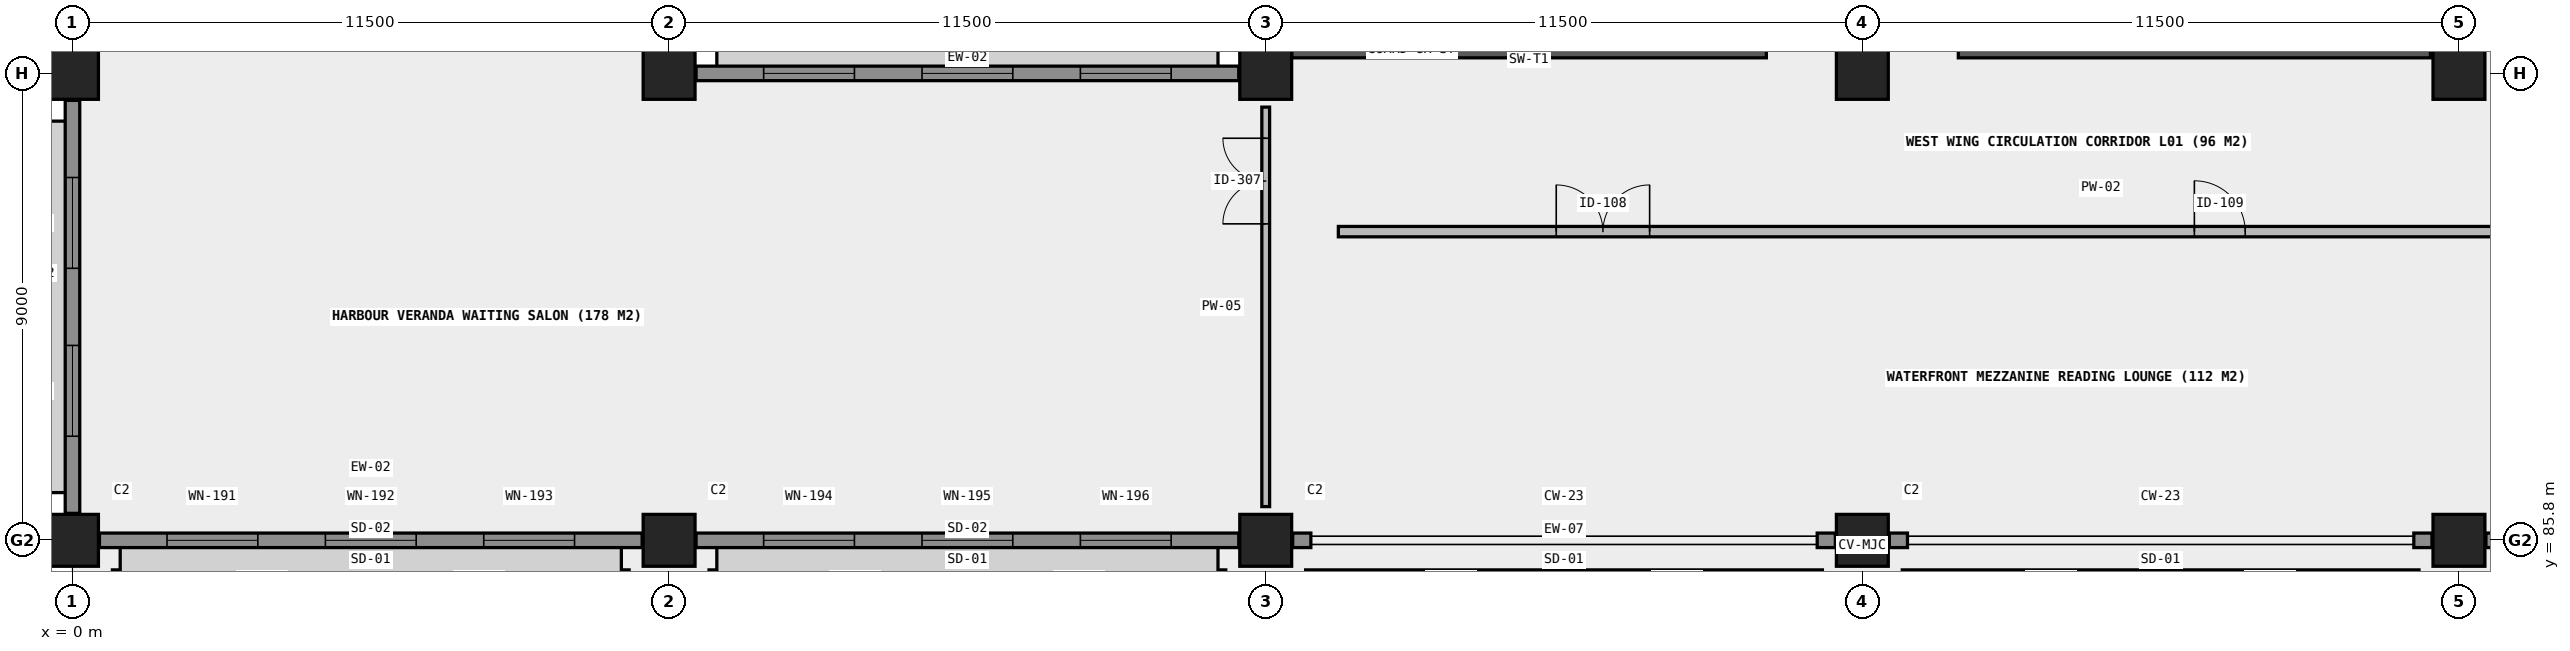
"""IFC4 building model, lengths in metres.
Left out: names, types, materials, properties, quantities, classifications, styles, units other than length and angle.
Written with IfcOpenShell. Run it as: python <this file> out.ifc"""

import sys

from ifc_helpers import new_model, si_unit, direction, frame, frame_2d, origin, origin_2d, place, context, subcontext, project, spatial, rectangle, extrude, element, fill, save


model = new_model("IFC4")
c1 = context("Model", 3, precision=1e-05, world=origin(), true_north=direction((0.0, 1.0)))
c2 = subcontext(c1, "Body", "Model", "MODEL_VIEW")
j1 = project(units=[si_unit("LENGTHUNIT", "METRE"), si_unit("PLANEANGLEUNIT", "RADIAN")], contexts=[c1])
p1 = place(None, origin())
s1 = spatial("IfcSite", under=j1, at=p1, CompositionType="ELEMENT")
p2 = place(p1, origin())
s2 = spatial("IfcBuilding", under=s1, at=p2, CompositionType="ELEMENT")
p3 = place(p2, frame((0.0, 0.0, 4.2)))
s3 = spatial("IfcBuildingStorey", under=s2, at=p3, CompositionType="ELEMENT", Elevation=4.2)
for number, where, z_axis, x_axis in (
    (1, (0.0, 85.8, 0.0), (0.0, 0.0, 1.0), (1.0, 0.0, 0.0)),
    (2, (0.0, 94.8, 0.0), (0.0, 0.0, 1.0), (1.0, 0.0, 0.0)),
    (3, (11.5, 85.8, 0.0), (0.0, 0.0, 1.0), (1.0, 0.0, 0.0)),
    (4, (11.5, 94.8, 0.0), (0.0, 0.0, 1.0), (1.0, 0.0, 0.0)),
    (5, (23.0, 85.8, 0.0), (0.0, 0.0, 1.0), (1.0, 0.0, 0.0)),
    (6, (23.0, 94.8, 0.0), (0.0, 0.0, 1.0), (1.0, 0.0, 0.0)),
    (7, (34.5, 85.8, 0.0), (0.0, 0.0, 1.0), (1.0, 0.0, 0.0)),
    (8, (34.5, 94.8, 0.0), (0.0, 0.0, 1.0), (1.0, 0.0, 0.0)),
    (9, (46.0, 85.8, 0.0), (0.0, 0.0, 1.0), (1.0, 0.0, 0.0)),
    (10, (46.0, 94.8, 0.0), (0.0, 0.0, 1.0), (1.0, 0.0, 0.0)),
):
    element("IfcColumn", number, at=place(p3, frame(where, z_axis=z_axis, x_axis=x_axis)), inside=s3, PredefinedType="COLUMN", context=c2, shape_type="SweptSolid", body=[
        extrude(rectangle(XDim=1.0, YDim=1.0, at=origin_2d()), origin(), (0.0, 0.0, 1.0), 4.2),
    ])
p4 = place(p3, frame((23.5, 95.325, 0.0), z_axis=(0.0, 0.0, 1.0), x_axis=(1.0, 0.0, 0.0)))
e11 = element("IfcWall", 11, at=p4, inside=s3, PredefinedType="SHEAR", context=c2, shape_type="SweptSolid", body=[
    extrude(rectangle(XDim=9.15, YDim=0.45, at=frame_2d((4.575, 0.0))), origin(), (0.0, 0.0, 1.0), 4.2),
])
p5 = place(p3, frame((36.35, 95.325, 0.0), z_axis=(0.0, 0.0, 1.0), x_axis=(1.0, 0.0, 0.0)))
e12 = element("IfcWall", 12, at=p5, inside=s3, PredefinedType="SHEAR", context=c2, shape_type="SweptSolid", body=[
    extrude(rectangle(XDim=9.1, YDim=0.45, at=frame_2d((4.55, 0.0))), origin(), (0.0, 0.0, 1.0), 4.2),
])
p6 = place(p3, frame((0.52, 85.8, 0.0), z_axis=(0.0, 0.0, 1.0), x_axis=(1.0, 0.0, 0.0)))
e13 = element("IfcWall", 13, at=p6, inside=s3, PredefinedType="SOLIDWALL", context=c2, shape_type="SweptSolid", body=[
    extrude(rectangle(XDim=10.46, YDim=0.28, at=frame_2d((5.23, 0.0))), origin(), (0.0, 0.0, 1.0), 3.15),
])
p7 = place(p6, frame((1.302, 0.0, 0.85)))
e14 = element("IfcOpeningElement", 14, at=p7, cuts=e13, PredefinedType="OPENING", context=c2, shape_type="SweptSolid", body=[
    extrude(rectangle(XDim=1.75, YDim=1.95, at=frame_2d((0.875, 0.975))), frame((0.0, 0.15, 0.0), z_axis=(0.0, -1.0, 0.0), x_axis=(1.0, 0.0, 0.0)), (0.0, 0.0, 1.0), 0.3),
])
p8 = place(p6, frame((4.355, 0.0, 0.85)))
e15 = element("IfcOpeningElement", 15, at=p8, cuts=e13, PredefinedType="OPENING", context=c2, shape_type="SweptSolid", body=[
    extrude(rectangle(XDim=1.75, YDim=1.95, at=frame_2d((0.875, 0.975))), frame((0.0, 0.15, 0.0), z_axis=(0.0, -1.0, 0.0), x_axis=(1.0, 0.0, 0.0)), (0.0, 0.0, 1.0), 0.3),
])
p9 = place(p6, frame((7.407, 0.0, 0.85)))
e16 = element("IfcOpeningElement", 16, at=p9, cuts=e13, PredefinedType="OPENING", context=c2, shape_type="SweptSolid", body=[
    extrude(rectangle(XDim=1.75, YDim=1.95, at=frame_2d((0.875, 0.975))), frame((0.0, 0.15, 0.0), z_axis=(0.0, -1.0, 0.0), x_axis=(1.0, 0.0, 0.0)), (0.0, 0.0, 1.0), 0.3),
])
p10 = place(p3, frame((12.02, 85.8, 0.0), z_axis=(0.0, 0.0, 1.0), x_axis=(1.0, 0.0, 0.0)))
e17 = element("IfcWall", 17, at=p10, inside=s3, PredefinedType="SOLIDWALL", context=c2, shape_type="SweptSolid", body=[
    extrude(rectangle(XDim=10.46, YDim=0.28, at=frame_2d((5.23, 0.0))), origin(), (0.0, 0.0, 1.0), 3.15),
])
p11 = place(p10, frame((1.302, 0.0, 0.85)))
e18 = element("IfcOpeningElement", 18, at=p11, cuts=e17, PredefinedType="OPENING", context=c2, shape_type="SweptSolid", body=[
    extrude(rectangle(XDim=1.75, YDim=1.95, at=frame_2d((0.875, 0.975))), frame((0.0, 0.15, 0.0), z_axis=(0.0, -1.0, 0.0), x_axis=(1.0, 0.0, 0.0)), (0.0, 0.0, 1.0), 0.3),
])
p12 = place(p10, frame((4.355, 0.0, 0.85)))
e19 = element("IfcOpeningElement", 19, at=p12, cuts=e17, PredefinedType="OPENING", context=c2, shape_type="SweptSolid", body=[
    extrude(rectangle(XDim=1.75, YDim=1.95, at=frame_2d((0.875, 0.975))), frame((0.0, 0.15, 0.0), z_axis=(0.0, -1.0, 0.0), x_axis=(1.0, 0.0, 0.0)), (0.0, 0.0, 1.0), 0.3),
])
p13 = place(p10, frame((7.407, 0.0, 0.85)))
e20 = element("IfcOpeningElement", 20, at=p13, cuts=e17, PredefinedType="OPENING", context=c2, shape_type="SweptSolid", body=[
    extrude(rectangle(XDim=1.75, YDim=1.95, at=frame_2d((0.875, 0.975))), frame((0.0, 0.15, 0.0), z_axis=(0.0, -1.0, 0.0), x_axis=(1.0, 0.0, 0.0)), (0.0, 0.0, 1.0), 0.3),
])
for number, where, z_axis, x_axis in (
    (21, (23.52, 85.8, 0.0), (0.0, 0.0, 1.0), (1.0, 0.0, 0.0)),
    (22, (33.63, 85.8, 0.0), (0.0, 0.0, 1.0), (1.0, 0.0, 0.0)),
    (23, (35.02, 85.8, 0.0), (0.0, 0.0, 1.0), (1.0, 0.0, 0.0)),
    (24, (45.13, 85.8, 0.0), (0.0, 0.0, 1.0), (1.0, 0.0, 0.0)),
):
    element("IfcWall", number, at=place(p3, frame(where, z_axis=z_axis, x_axis=x_axis)), inside=s3, PredefinedType="SOLIDWALL", context=c2, shape_type="SweptSolid", body=[
        extrude(rectangle(XDim=0.35, YDim=0.28, at=frame_2d((0.175, 0.0))), origin(), (0.0, 0.0, 1.0), 3.93),
    ])
p14 = place(p3, frame((46.52, 85.8, 0.0), z_axis=(0.0, 0.0, 1.0), x_axis=(1.0, 0.0, 0.0)))
e25 = element("IfcWall", 25, at=p14, inside=s3, PredefinedType="SOLIDWALL", context=c2, shape_type="SweptSolid", body=[
    extrude(rectangle(XDim=10.46, YDim=0.28, at=frame_2d((5.23, 0.0))), origin(), (0.0, 0.0, 1.0), 3.15),
])
p15 = place(p14, frame((1.302, 0.0, 0.85)))
e26 = element("IfcOpeningElement", 26, at=p15, cuts=e25, PredefinedType="OPENING", context=c2, shape_type="SweptSolid", body=[
    extrude(rectangle(XDim=1.75, YDim=1.95, at=frame_2d((0.875, 0.975))), frame((0.0, 0.15, 0.0), z_axis=(0.0, -1.0, 0.0), x_axis=(1.0, 0.0, 0.0)), (0.0, 0.0, 1.0), 0.3),
])
p16 = place(p14, frame((4.355, 0.0, 0.85)))
e27 = element("IfcOpeningElement", 27, at=p16, cuts=e25, PredefinedType="OPENING", context=c2, shape_type="SweptSolid", body=[
    extrude(rectangle(XDim=1.75, YDim=1.95, at=frame_2d((0.875, 0.975))), frame((0.0, 0.15, 0.0), z_axis=(0.0, -1.0, 0.0), x_axis=(1.0, 0.0, 0.0)), (0.0, 0.0, 1.0), 0.3),
])
p17 = place(p14, frame((7.407, 0.0, 0.85)))
e28 = element("IfcOpeningElement", 28, at=p17, cuts=e25, PredefinedType="OPENING", context=c2, shape_type="SweptSolid", body=[
    extrude(rectangle(XDim=1.75, YDim=1.95, at=frame_2d((0.875, 0.975))), frame((0.0, 0.15, 0.0), z_axis=(0.0, -1.0, 0.0), x_axis=(1.0, 0.0, 0.0)), (0.0, 0.0, 1.0), 0.3),
])
p18 = place(p3, frame((12.02, 94.8, 0.0), z_axis=(0.0, 0.0, 1.0), x_axis=(1.0, 0.0, 0.0)))
e29 = element("IfcWall", 29, at=p18, inside=s3, PredefinedType="SOLIDWALL", context=c2, shape_type="SweptSolid", body=[
    extrude(rectangle(XDim=10.46, YDim=0.28, at=frame_2d((5.23, 0.0))), origin(), (0.0, 0.0, 1.0), 3.15),
])
p19 = place(p18, frame((1.302, 0.0, 0.85)))
e30 = element("IfcOpeningElement", 30, at=p19, cuts=e29, PredefinedType="OPENING", context=c2, shape_type="SweptSolid", body=[
    extrude(rectangle(XDim=1.75, YDim=1.95, at=frame_2d((0.875, 0.975))), frame((0.0, 0.15, 0.0), z_axis=(0.0, -1.0, 0.0), x_axis=(1.0, 0.0, 0.0)), (0.0, 0.0, 1.0), 0.3),
])
p20 = place(p18, frame((4.355, 0.0, 0.85)))
e31 = element("IfcOpeningElement", 31, at=p20, cuts=e29, PredefinedType="OPENING", context=c2, shape_type="SweptSolid", body=[
    extrude(rectangle(XDim=1.75, YDim=1.95, at=frame_2d((0.875, 0.975))), frame((0.0, 0.15, 0.0), z_axis=(0.0, -1.0, 0.0), x_axis=(1.0, 0.0, 0.0)), (0.0, 0.0, 1.0), 0.3),
])
p21 = place(p18, frame((7.407, 0.0, 0.85)))
e32 = element("IfcOpeningElement", 32, at=p21, cuts=e29, PredefinedType="OPENING", context=c2, shape_type="SweptSolid", body=[
    extrude(rectangle(XDim=1.75, YDim=1.95, at=frame_2d((0.875, 0.975))), frame((0.0, 0.15, 0.0), z_axis=(0.0, -1.0, 0.0), x_axis=(1.0, 0.0, 0.0)), (0.0, 0.0, 1.0), 0.3),
])
p22 = place(p3, frame((0.0, 86.32, 0.0), z_axis=(0.0, 0.0, 1.0), x_axis=(0.0, 1.0, 0.0)))
e33 = element("IfcWall", 33, at=p22, inside=s3, PredefinedType="SOLIDWALL", context=c2, shape_type="SweptSolid", body=[
    extrude(rectangle(XDim=7.96, YDim=0.28, at=frame_2d((3.98, 0.0))), origin(), (0.0, 0.0, 1.0), 3.25),
])
p23 = place(p22, frame((1.487, 0.0, 0.85)))
e34 = element("IfcOpeningElement", 34, at=p23, cuts=e33, PredefinedType="OPENING", context=c2, shape_type="SweptSolid", body=[
    extrude(rectangle(XDim=1.75, YDim=1.95, at=frame_2d((0.875, 0.975))), frame((0.0, 0.15, 0.0), z_axis=(0.0, -1.0, 0.0), x_axis=(1.0, 0.0, 0.0)), (0.0, 0.0, 1.0), 0.3),
])
p24 = place(p22, frame((4.723, 0.0, 0.85)))
e35 = element("IfcOpeningElement", 35, at=p24, cuts=e33, PredefinedType="OPENING", context=c2, shape_type="SweptSolid", body=[
    extrude(rectangle(XDim=1.75, YDim=1.95, at=frame_2d((0.875, 0.975))), frame((0.0, 0.15, 0.0), z_axis=(0.0, -1.0, 0.0), x_axis=(1.0, 0.0, 0.0)), (0.0, 0.0, 1.0), 0.3),
])
p25 = place(p3, frame((24.4, 91.75, 0.0), z_axis=(0.0, 0.0, 1.0), x_axis=(1.0, 0.0, 0.0)))
e36 = element("IfcWall", 36, at=p25, inside=s3, PredefinedType="PARTITIONING", context=c2, shape_type="SweptSolid", body=[
    extrude(rectangle(XDim=29.4, YDim=0.2, at=frame_2d((14.7, 0.0))), origin(), (0.0, 0.0, 1.0), 3.84),
])
p26 = place(p25, frame((4.2, 0.0, 0.0)))
e37 = element("IfcOpeningElement", 37, at=p26, cuts=e36, PredefinedType="OPENING", context=c2, shape_type="SweptSolid", body=[
    extrude(rectangle(XDim=1.8, YDim=2.2, at=frame_2d((0.9, 1.1))), frame((0.0, 0.11, 0.0), z_axis=(0.0, -1.0, 0.0), x_axis=(1.0, 0.0, 0.0)), (0.0, 0.0, 1.0), 0.22),
])
p27 = place(p25, frame((16.5, 0.0, 0.0)))
e38 = element("IfcOpeningElement", 38, at=p27, cuts=e36, PredefinedType="OPENING", context=c2, shape_type="SweptSolid", body=[
    extrude(rectangle(XDim=0.98, YDim=2.15, at=frame_2d((0.49, 1.075))), frame((0.0, 0.11, 0.0), z_axis=(0.0, -1.0, 0.0), x_axis=(1.0, 0.0, 0.0)), (0.0, 0.0, 1.0), 0.22),
])
p28 = place(p3, frame((23.0, 86.45, 0.0), z_axis=(0.0, 0.0, 1.0), x_axis=(0.0, 1.0, 0.0)))
e39 = element("IfcWall", 39, at=p28, inside=s3, PredefinedType="PARTITIONING", context=c2, shape_type="SweptSolid", body=[
    extrude(rectangle(XDim=7.7, YDim=0.15, at=frame_2d((3.85, 0.0))), origin(), (0.0, 0.0, 1.0), 3.15),
])
p29 = place(p28, frame((5.45, 0.0, 0.0)))
e40 = element("IfcOpeningElement", 40, at=p29, cuts=e39, PredefinedType="OPENING", context=c2, shape_type="SweptSolid", body=[
    extrude(rectangle(XDim=1.65, YDim=2.2, at=frame_2d((0.825, 1.1))), frame((0.0, 0.085, 0.0), z_axis=(0.0, -1.0, 0.0), x_axis=(1.0, 0.0, 0.0)), (0.0, 0.0, 1.0), 0.17),
])
p30 = place(p7, origin())
e41 = element("IfcWindow", 41, at=p30, inside=s3, PartitioningType="SINGLE_PANEL", PredefinedType="WINDOW", context=c2, shape_type="SweptSolid", body=[
    extrude(rectangle(XDim=1.75, YDim=1.95, at=frame_2d((0.875, 0.975))), frame((0.0, 0.03, 0.0), z_axis=(0.0, -1.0, 0.0), x_axis=(1.0, 0.0, 0.0)), (0.0, 0.0, 1.0), 0.06),
])
fill(e14, e41)
p31 = place(p8, origin())
e42 = element("IfcWindow", 42, at=p31, inside=s3, PartitioningType="SINGLE_PANEL", PredefinedType="WINDOW", context=c2, shape_type="SweptSolid", body=[
    extrude(rectangle(XDim=1.75, YDim=1.95, at=frame_2d((0.875, 0.975))), frame((0.0, 0.03, 0.0), z_axis=(0.0, -1.0, 0.0), x_axis=(1.0, 0.0, 0.0)), (0.0, 0.0, 1.0), 0.06),
])
fill(e15, e42)
p32 = place(p9, origin())
e43 = element("IfcWindow", 43, at=p32, inside=s3, PartitioningType="SINGLE_PANEL", PredefinedType="WINDOW", context=c2, shape_type="SweptSolid", body=[
    extrude(rectangle(XDim=1.75, YDim=1.95, at=frame_2d((0.875, 0.975))), frame((0.0, 0.03, 0.0), z_axis=(0.0, -1.0, 0.0), x_axis=(1.0, 0.0, 0.0)), (0.0, 0.0, 1.0), 0.06),
])
fill(e16, e43)
p33 = place(p11, origin())
e44 = element("IfcWindow", 44, at=p33, inside=s3, PartitioningType="SINGLE_PANEL", PredefinedType="WINDOW", context=c2, shape_type="SweptSolid", body=[
    extrude(rectangle(XDim=1.75, YDim=1.95, at=frame_2d((0.875, 0.975))), frame((0.0, 0.03, 0.0), z_axis=(0.0, -1.0, 0.0), x_axis=(1.0, 0.0, 0.0)), (0.0, 0.0, 1.0), 0.06),
])
fill(e18, e44)
p34 = place(p12, origin())
e45 = element("IfcWindow", 45, at=p34, inside=s3, PartitioningType="SINGLE_PANEL", PredefinedType="WINDOW", context=c2, shape_type="SweptSolid", body=[
    extrude(rectangle(XDim=1.75, YDim=1.95, at=frame_2d((0.875, 0.975))), frame((0.0, 0.03, 0.0), z_axis=(0.0, -1.0, 0.0), x_axis=(1.0, 0.0, 0.0)), (0.0, 0.0, 1.0), 0.06),
])
fill(e19, e45)
p35 = place(p13, origin())
e46 = element("IfcWindow", 46, at=p35, inside=s3, PartitioningType="SINGLE_PANEL", PredefinedType="WINDOW", context=c2, shape_type="SweptSolid", body=[
    extrude(rectangle(XDim=1.75, YDim=1.95, at=frame_2d((0.875, 0.975))), frame((0.0, 0.03, 0.0), z_axis=(0.0, -1.0, 0.0), x_axis=(1.0, 0.0, 0.0)), (0.0, 0.0, 1.0), 0.06),
])
fill(e20, e46)
p36 = place(p19, origin())
e47 = element("IfcWindow", 47, at=p36, inside=s3, PartitioningType="SINGLE_PANEL", PredefinedType="WINDOW", context=c2, shape_type="SweptSolid", body=[
    extrude(rectangle(XDim=1.75, YDim=1.95, at=frame_2d((0.875, 0.975))), frame((0.0, 0.03, 0.0), z_axis=(0.0, -1.0, 0.0), x_axis=(1.0, 0.0, 0.0)), (0.0, 0.0, 1.0), 0.06),
])
fill(e30, e47)
p37 = place(p20, origin())
e48 = element("IfcWindow", 48, at=p37, inside=s3, PartitioningType="SINGLE_PANEL", PredefinedType="WINDOW", context=c2, shape_type="SweptSolid", body=[
    extrude(rectangle(XDim=1.75, YDim=1.95, at=frame_2d((0.875, 0.975))), frame((0.0, 0.03, 0.0), z_axis=(0.0, -1.0, 0.0), x_axis=(1.0, 0.0, 0.0)), (0.0, 0.0, 1.0), 0.06),
])
fill(e31, e48)
p38 = place(p21, origin())
e49 = element("IfcWindow", 49, at=p38, inside=s3, PartitioningType="SINGLE_PANEL", PredefinedType="WINDOW", context=c2, shape_type="SweptSolid", body=[
    extrude(rectangle(XDim=1.75, YDim=1.95, at=frame_2d((0.875, 0.975))), frame((0.0, 0.03, 0.0), z_axis=(0.0, -1.0, 0.0), x_axis=(1.0, 0.0, 0.0)), (0.0, 0.0, 1.0), 0.06),
])
fill(e32, e49)
p39 = place(p23, origin())
e50 = element("IfcWindow", 50, at=p39, inside=s3, PartitioningType="SINGLE_PANEL", PredefinedType="WINDOW", context=c2, shape_type="SweptSolid", body=[
    extrude(rectangle(XDim=1.75, YDim=1.95, at=frame_2d((0.875, 0.975))), frame((0.0, 0.03, 0.0), z_axis=(0.0, -1.0, 0.0), x_axis=(1.0, 0.0, 0.0)), (0.0, 0.0, 1.0), 0.06),
])
fill(e34, e50)
p40 = place(p24, origin())
e51 = element("IfcWindow", 51, at=p40, inside=s3, PartitioningType="SINGLE_PANEL", PredefinedType="WINDOW", context=c2, shape_type="SweptSolid", body=[
    extrude(rectangle(XDim=1.75, YDim=1.95, at=frame_2d((0.875, 0.975))), frame((0.0, 0.03, 0.0), z_axis=(0.0, -1.0, 0.0), x_axis=(1.0, 0.0, 0.0)), (0.0, 0.0, 1.0), 0.06),
])
fill(e35, e51)
p41 = place(p26, origin())
e52 = element("IfcDoor", 52, at=p41, inside=s3, OperationType="DOUBLE_DOOR_SINGLE_SWING", PredefinedType="DOOR", context=c2, shape_type="SweptSolid", body=[
    extrude(rectangle(XDim=1.8, YDim=2.2, at=frame_2d((0.9, 1.1))), frame((0.0, 0.025, 0.0), z_axis=(0.0, -1.0, 0.0), x_axis=(1.0, 0.0, 0.0)), (0.0, 0.0, 1.0), 0.05),
])
fill(e37, e52)
p42 = place(p27, origin())
e53 = element("IfcDoor", 53, at=p42, inside=s3, OperationType="SINGLE_SWING_LEFT", PredefinedType="DOOR", context=c2, shape_type="SweptSolid", body=[
    extrude(rectangle(XDim=0.98, YDim=2.15, at=frame_2d((0.49, 1.075))), frame((0.0, 0.025, 0.0), z_axis=(0.0, -1.0, 0.0), x_axis=(1.0, 0.0, 0.0)), (0.0, 0.0, 1.0), 0.05),
])
fill(e38, e53)
p43 = place(p29, origin())
e54 = element("IfcDoor", 54, at=p43, inside=s3, OperationType="DOUBLE_DOOR_SINGLE_SWING", PredefinedType="DOOR", context=c2, shape_type="SweptSolid", body=[
    extrude(rectangle(XDim=1.65, YDim=2.2, at=frame_2d((0.825, 1.1))), frame((0.0, 0.025, 0.0), z_axis=(0.0, -1.0, 0.0), x_axis=(1.0, 0.0, 0.0)), (0.0, 0.0, 1.0), 0.05),
])
fill(e40, e54)
save(model, sys.argv[1])
